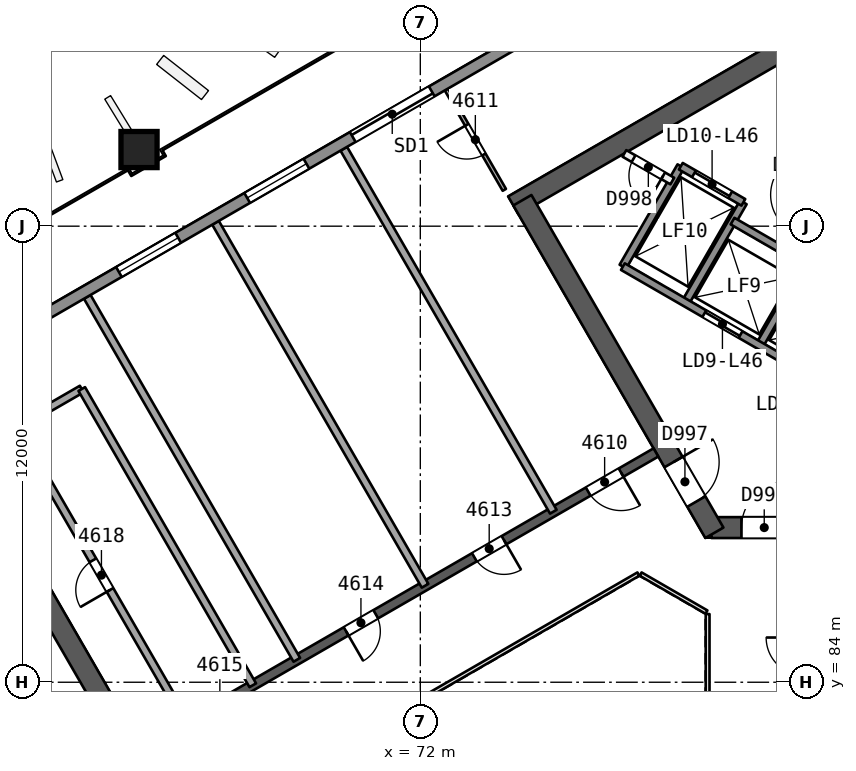
"""IFC4 building model, lengths in metres.
Left out: names, types, materials, properties, quantities, classifications, styles, units other than length and angle.
Written with IfcOpenShell. Run it as: python <this file> out.ifc"""

import sys

from ifc_helpers import new_model, si_unit, direction, frame, frame_2d, origin, origin_2d, place, context, subcontext, project, spatial, rectangle, extrude, element, fill, save


model = new_model("IFC4")
c1 = context("Model", 3, precision=1e-05, world=origin(), true_north=direction((0.0, 1.0)))
c2 = subcontext(c1, "Body", "Model", "MODEL_VIEW")
j1 = project(units=[si_unit("LENGTHUNIT", "METRE"), si_unit("PLANEANGLEUNIT", "RADIAN")], contexts=[c1])
p1 = place(None, origin())
s1 = spatial("IfcSite", under=j1, at=p1, CompositionType="ELEMENT")
p2 = place(p1, origin())
s2 = spatial("IfcBuilding", under=s1, at=p2, CompositionType="ELEMENT")
p3 = place(p2, frame((0.0, 0.0, 189.6)))
s3 = spatial("IfcBuildingStorey", under=s2, at=p3, CompositionType="ELEMENT", Elevation=189.6)
p4 = place(p3, frame((65.682, 80.0, 0.0), z_axis=(0.0, 0.0, 1.0), x_axis=(-0.500000202252, 0.866025287014, 0.0)))
e1 = element("IfcWall", 1, at=p4, inside=s3, PredefinedType="SHEAR", context=c2, shape_type="SweptSolid", body=[
    extrude(rectangle(XDim=10.221, YDim=0.55, at=frame_2d((5.111, 0.0))), origin(), (0.0, 0.0, 1.0), 3.7),
])
p5 = place(p4, frame((0.791, 0.0, 0.0)))
e2 = element("IfcOpeningElement", 2, at=p5, cuts=e1, PredefinedType="OPENING", context=c2, shape_type="SweptSolid", body=[
    extrude(rectangle(XDim=1.2, YDim=2.1, at=frame_2d((0.6, 1.05))), frame((0.0, 0.286, 0.0), z_axis=(0.0, -1.0, 0.0), x_axis=(1.0, 0.0, 0.0)), (0.0, 0.0, 1.0), 0.571),
])
p6 = place(p3, frame((79.659, 88.069, 0.0), z_axis=(0.0, 0.0, 1.0), x_axis=(1.0, 0.0, 0.0)))
e3 = element("IfcWall", 3, at=p6, inside=s3, PredefinedType="SHEAR", context=c2, shape_type="SweptSolid", body=[
    extrude(rectangle(XDim=10.221, YDim=0.55, at=frame_2d((5.111, 0.0))), origin(), (0.0, 0.0, 1.0), 3.7),
])
p7 = place(p6, frame((0.791, 0.0, 0.0)))
e4 = element("IfcOpeningElement", 4, at=p7, cuts=e3, PredefinedType="OPENING", context=c2, shape_type="SweptSolid", body=[
    extrude(rectangle(XDim=1.2, YDim=2.1, at=frame_2d((0.6, 1.05))), frame((0.0, 0.286, 0.0), z_axis=(0.0, -1.0, 0.0), x_axis=(1.0, 0.0, 0.0)), (0.0, 0.0, 1.0), 0.571),
])
p8 = place(p3, frame((86.723, 103.633, 0.0), z_axis=(0.0, 0.0, 1.0), x_axis=(-0.866023530946, -0.500003243837, 0.0)))
e5 = element("IfcWall", 5, at=p8, inside=s3, PredefinedType="SHEAR", context=c2, shape_type="SweptSolid", body=[
    extrude(rectangle(XDim=14.175, YDim=0.55, at=frame_2d((7.087, 0.0))), origin(), (0.0, 0.0, 1.0), 3.7),
])
p9 = place(p3, frame((74.686, 96.683, 0.0), z_axis=(0.0, 0.0, 1.0), x_axis=(0.499997818338, -0.866026663364, 0.0)))
e6 = element("IfcWall", 6, at=p9, inside=s3, PredefinedType="SHEAR", context=c2, shape_type="SweptSolid", body=[
    extrude(rectangle(XDim=10.105, YDim=0.55, at=frame_2d((5.052, 0.0))), origin(), (0.0, 0.0, 1.0), 3.7),
])
p10 = place(p9, frame((7.955, 0.0, 0.0)))
e7 = element("IfcOpeningElement", 7, at=p10, cuts=e6, PredefinedType="OPENING", context=c2, shape_type="SweptSolid", body=[
    extrude(rectangle(XDim=1.2, YDim=2.1, at=frame_2d((0.6, 1.05))), frame((0.0, 0.286, 0.0), z_axis=(0.0, -1.0, 0.0), x_axis=(1.0, 0.0, 0.0)), (0.0, 0.0, 1.0), 0.571),
])
p11 = place(p3, frame((78.2, 90.046, 0.0), z_axis=(0.0, 0.0, 1.0), x_axis=(-0.866026492143, -0.499998114903, 0.0)))
e8 = element("IfcWall", 8, at=p11, inside=s3, PredefinedType="SHEAR", context=c2, shape_type="SweptSolid", body=[
    extrude(rectangle(XDim=15.588, YDim=0.25, at=frame_2d((7.794, 0.0))), origin(), (0.0, 0.0, 1.0), 3.25),
])
p12 = place(p11, frame((1.059, 0.0, 0.0)))
e9 = element("IfcOpeningElement", 9, at=p12, cuts=e8, PredefinedType="OPENING", context=c2, shape_type="SweptSolid", body=[
    extrude(rectangle(XDim=1.0, YDim=2.1, at=frame_2d((0.5, 1.05))), frame((0.0, 0.135, 0.0), z_axis=(0.0, -1.0, 0.0), x_axis=(1.0, 0.0, 0.0)), (0.0, 0.0, 1.0), 0.271),
])
p13 = place(p11, frame((4.616, 0.0, 0.0)))
e10 = element("IfcOpeningElement", 10, at=p13, cuts=e8, PredefinedType="OPENING", context=c2, shape_type="SweptSolid", body=[
    extrude(rectangle(XDim=0.9, YDim=2.1, at=frame_2d((0.45, 1.05))), frame((0.0, 0.135, 0.0), z_axis=(0.0, -1.0, 0.0), x_axis=(1.0, 0.0, 0.0)), (0.0, 0.0, 1.0), 0.271),
])
p14 = place(p11, frame((8.513, 0.0, 0.0)))
e11 = element("IfcOpeningElement", 11, at=p14, cuts=e8, PredefinedType="OPENING", context=c2, shape_type="SweptSolid", body=[
    extrude(rectangle(XDim=0.9, YDim=2.1, at=frame_2d((0.45, 1.05))), frame((0.0, 0.135, 0.0), z_axis=(0.0, -1.0, 0.0), x_axis=(1.0, 0.0, 0.0)), (0.0, 0.0, 1.0), 0.271),
])
p15 = place(p11, frame((12.75, 0.0, 0.0)))
e12 = element("IfcOpeningElement", 12, at=p15, cuts=e8, PredefinedType="OPENING", context=c2, shape_type="SweptSolid", body=[
    extrude(rectangle(XDim=1.0, YDim=2.1, at=frame_2d((0.5, 1.05))), frame((0.0, 0.135, 0.0), z_axis=(0.0, -1.0, 0.0), x_axis=(1.0, 0.0, 0.0)), (0.0, 0.0, 1.0), 0.271),
])
p16 = place(p3, frame((64.586, 98.037, 0.0), z_axis=(0.010093620709, -0.017482414954, 0.999796221231), x_axis=(0.86601685016, 0.500014815019, 2.20911e-07)))
e13 = element("IfcColumn", 13, at=p16, inside=s3, PredefinedType="COLUMN", context=c2, shape_type="SweptSolid", body=[
    extrude(rectangle(XDim=0.95, YDim=0.95, at=origin_2d()), origin(), (0.0, 0.0, 1.0), 3.701),
])
p17 = place(p3, frame((74.21, 96.956, 0.0), z_axis=(0.0, 0.0, 1.0), x_axis=(-0.499978833458, 0.866037623948, 0.0)))
e14 = element("IfcWall", 14, at=p17, inside=s3, PredefinedType="PARTITIONING", context=c2, shape_type="SweptSolid", body=[
    extrude(rectangle(XDim=3.05, YDim=0.1, at=frame_2d((1.525, 0.0))), origin(), (0.0, 0.0, 1.0), 3.25),
])
p18 = place(p17, frame((1.075, 0.0, 0.0)))
e15 = element("IfcOpeningElement", 15, at=p18, cuts=e14, PredefinedType="OPENING", context=c2, shape_type="SweptSolid", body=[
    extrude(rectangle(XDim=0.9, YDim=2.1, at=frame_2d((0.45, 1.05))), frame((0.0, 0.061, 0.0), z_axis=(0.0, -1.0, 0.0), x_axis=(1.0, 0.0, 0.0)), (0.0, 0.0, 1.0), 0.121),
])
for number, where, z_axis, x_axis in (
    (16, (69.986, 98.038, 0.0), (0.0, 0.0, 1.0), (0.5, -0.866, 0.0)),
    (17, (66.611, 96.09, 0.0), (0.0, 0.0, 1.0), (0.5, -0.866, 0.0)),
    (18, (63.236, 94.141, 0.0), (0.0, 0.0, 1.0), (0.5, -0.866, 0.0)),
):
    element("IfcWall", number, at=place(p3, frame(where, z_axis=z_axis, x_axis=x_axis)), inside=s3, PredefinedType="PARTITIONING", context=c2, shape_type="SweptSolid", body=[
        extrude(rectangle(XDim=11.029, YDim=0.2, at=frame_2d((5.514, 0.0))), origin(), (0.0, 0.0, 1.0), 3.25),
    ])
p19 = place(p3, frame((65.859, 82.921, 0.0), z_axis=(0.0, 0.0, 1.0), x_axis=(-0.5000018851, 0.866024315419, 0.0)))
e19 = element("IfcWall", 19, at=p19, inside=s3, PredefinedType="PARTITIONING", context=c2, shape_type="SweptSolid", body=[
    extrude(rectangle(XDim=9.0, YDim=0.2, at=frame_2d((4.5, 0.0))), origin(), (0.0, 0.0, 1.0), 3.25),
])
p20 = place(p19, frame((4.05, 0.0, 0.0)))
e20 = element("IfcOpeningElement", 20, at=p20, cuts=e19, PredefinedType="OPENING", context=c2, shape_type="SweptSolid", body=[
    extrude(rectangle(XDim=0.9, YDim=2.1, at=frame_2d((0.45, 1.05))), frame((0.0, 0.11, 0.0), z_axis=(0.0, -1.0, 0.0), x_axis=(1.0, 0.0, 0.0)), (0.0, 0.0, 1.0), 0.221),
])
p21 = place(p3, frame((61.359, 90.715, 0.0), z_axis=(0.0, 0.0, 1.0), x_axis=(0.866041268327, 0.499972520799, 0.0)))
e21 = element("IfcWall", 21, at=p21, inside=s3, PredefinedType="PARTITIONING", context=c2, shape_type="SweptSolid", body=[
    extrude(rectangle(XDim=2.0, YDim=0.2, at=frame_2d((1.0, 0.0))), origin(), (0.0, 0.0, 1.0), 3.25),
])
p22 = place(p3, frame((63.091, 91.715, 0.0), z_axis=(0.0, 0.0, 1.0), x_axis=(0.5000018851, -0.866024315419, 0.0)))
e22 = element("IfcWall", 22, at=p22, inside=s3, PredefinedType="PARTITIONING", context=c2, shape_type="SweptSolid", body=[
    extrude(rectangle(XDim=9.0, YDim=0.2, at=frame_2d((4.5, 0.0))), origin(), (0.0, 0.0, 1.0), 3.25),
])
p23 = place(p3, frame((43.101, 82.689, 0.0), z_axis=(0.0, 0.0, 1.0), x_axis=(0.866025007541, 0.500000686313, 0.0)))
e23 = element("IfcWall", 23, at=p23, inside=s3, PredefinedType="SOLIDWALL", context=c2, shape_type="SweptSolid", body=[
    extrude(rectangle(XDim=52.562, YDim=0.3, at=frame_2d((26.281, 0.0))), origin(), (0.0, 0.0, 1.0), 3.25),
])
p24 = place(p23, frame((31.316, 0.0, 0.0)))
e24 = element("IfcOpeningElement", 24, at=p24, cuts=e23, PredefinedType="OPENING", context=c2, shape_type="SweptSolid", body=[
    extrude(rectangle(XDim=2.4, YDim=2.4, at=frame_2d((1.2, 1.2))), frame((0.0, 0.161, 0.0), z_axis=(0.0, -1.0, 0.0), x_axis=(1.0, 0.0, 0.0)), (0.0, 0.0, 1.0), 0.321),
])
p25 = place(p23, frame((40.864, 0.0, 0.0)))
e25 = element("IfcOpeningElement", 25, at=p25, cuts=e23, PredefinedType="OPENING", context=c2, shape_type="SweptSolid", body=[
    extrude(rectangle(XDim=2.4, YDim=2.4, at=frame_2d((1.2, 1.2))), frame((0.0, 0.161, 0.0), z_axis=(0.0, -1.0, 0.0), x_axis=(1.0, 0.0, 0.0)), (0.0, 0.0, 1.0), 0.321),
])
p26 = place(p23, frame((19.625, 0.0, 0.0)))
e26 = element("IfcOpeningElement", 26, at=p26, cuts=e23, PredefinedType="OPENING", context=c2, shape_type="SweptSolid", body=[
    extrude(rectangle(XDim=2.4, YDim=2.4, at=frame_2d((1.2, 1.2))), frame((0.0, 0.161, 0.0), z_axis=(0.0, -1.0, 0.0), x_axis=(1.0, 0.0, 0.0)), (0.0, 0.0, 1.0), 0.321),
])
p27 = place(p23, frame((9.277, 0.0, 0.0)))
e27 = element("IfcOpeningElement", 27, at=p27, cuts=e23, PredefinedType="OPENING", context=c2, shape_type="SweptSolid", body=[
    extrude(rectangle(XDim=2.4, YDim=2.4, at=frame_2d((1.2, 1.2))), frame((0.0, 0.161, 0.0), z_axis=(0.0, -1.0, 0.0), x_axis=(1.0, 0.0, 0.0)), (0.0, 0.0, 1.0), 0.321),
])
p28 = place(p23, frame((28.109, 0.0, 0.9)))
e28 = element("IfcOpeningElement", 28, at=p28, cuts=e23, PredefinedType="OPENING", context=c2, shape_type="SweptSolid", body=[
    extrude(rectangle(XDim=1.8, YDim=1.5, at=frame_2d((0.9, 0.75))), frame((0.0, 0.161, 0.0), z_axis=(0.0, -1.0, 0.0), x_axis=(1.0, 0.0, 0.0)), (0.0, 0.0, 1.0), 0.321),
])
p29 = place(p23, frame((24.212, 0.0, 0.9)))
e29 = element("IfcOpeningElement", 29, at=p29, cuts=e23, PredefinedType="OPENING", context=c2, shape_type="SweptSolid", body=[
    extrude(rectangle(XDim=1.8, YDim=1.5, at=frame_2d((0.9, 0.75))), frame((0.0, 0.161, 0.0), z_axis=(0.0, -1.0, 0.0), x_axis=(1.0, 0.0, 0.0)), (0.0, 0.0, 1.0), 0.321),
])
p30 = place(p3, frame((80.924, 92.861, 0.0), z_axis=(0.0, 0.0, 1.0), x_axis=(0.499961042966, 0.86604789447, 0.0)))
e30 = element("IfcWall", 30, at=p30, inside=s3, PredefinedType="SOLIDWALL", context=c2, shape_type="SweptSolid", body=[
    extrude(rectangle(XDim=2.48, YDim=0.2, at=frame_2d((1.24, 0.0))), origin(), (0.0, 0.0, 1.0), 3.25),
])
for number, where, z_axis, x_axis in (
    (31, (78.976, 93.986, 0.0), (0.0, 0.0, 1.0), (0.5, 0.866, 0.0)),
    (32, (77.33, 94.936, 0.0), (0.0, 0.0, 1.0), (0.5, 0.866, 0.0)),
):
    element("IfcWall", number, at=place(p3, frame(where, z_axis=z_axis, x_axis=x_axis)), inside=s3, PredefinedType="SOLIDWALL", context=c2, shape_type="SweptSolid", body=[
        extrude(rectangle(XDim=3.05, YDim=0.2, at=frame_2d((1.525, 0.0))), origin(), (0.0, 0.0, 1.0), 3.25),
    ])
p31 = place(p3, frame((86.77, 89.486, 0.0), z_axis=(0.0, 0.0, 1.0), x_axis=(-0.86601811187, 0.500012629753, 0.0)))
e33 = element("IfcWall", 33, at=p31, inside=s3, PredefinedType="SOLIDWALL", context=c2, shape_type="SweptSolid", body=[
    extrude(rectangle(XDim=10.9, YDim=0.2, at=frame_2d((5.45, 0.0))), origin(), (0.0, 0.0, 1.0), 3.25),
])
p32 = place(p31, frame((0.575, 0.0, 0.0)))
e34 = element("IfcOpeningElement", 34, at=p32, cuts=e33, PredefinedType="OPENING", context=c2, shape_type="SweptSolid", body=[
    extrude(rectangle(XDim=1.1, YDim=2.1, at=frame_2d((0.55, 1.05))), frame((0.0, 0.11, 0.0), z_axis=(0.0, -1.0, 0.0), x_axis=(1.0, 0.0, 0.0)), (0.0, 0.0, 1.0), 0.221),
])
p33 = place(p31, frame((2.825, 0.0, 0.0)))
e35 = element("IfcOpeningElement", 35, at=p33, cuts=e33, PredefinedType="OPENING", context=c2, shape_type="SweptSolid", body=[
    extrude(rectangle(XDim=1.1, YDim=2.1, at=frame_2d((0.55, 1.05))), frame((0.0, 0.11, 0.0), z_axis=(0.0, -1.0, 0.0), x_axis=(1.0, 0.0, 0.0)), (0.0, 0.0, 1.0), 0.221),
])
p34 = place(p31, frame((5.075, 0.0, 0.0)))
e36 = element("IfcOpeningElement", 36, at=p34, cuts=e33, PredefinedType="OPENING", context=c2, shape_type="SweptSolid", body=[
    extrude(rectangle(XDim=1.1, YDim=2.1, at=frame_2d((0.55, 1.05))), frame((0.0, 0.11, 0.0), z_axis=(0.0, -1.0, 0.0), x_axis=(1.0, 0.0, 0.0)), (0.0, 0.0, 1.0), 0.221),
])
p35 = place(p31, frame((7.325, 0.0, 0.0)))
e37 = element("IfcOpeningElement", 37, at=p35, cuts=e33, PredefinedType="OPENING", context=c2, shape_type="SweptSolid", body=[
    extrude(rectangle(XDim=1.1, YDim=2.1, at=frame_2d((0.55, 1.05))), frame((0.0, 0.11, 0.0), z_axis=(0.0, -1.0, 0.0), x_axis=(1.0, 0.0, 0.0)), (0.0, 0.0, 1.0), 0.221),
])
p36 = place(p3, frame((89.33, 90.872, 0.0), z_axis=(0.0, 0.0, 1.0), x_axis=(-0.866027589512, 0.49999621419, 0.0)))
e38 = element("IfcWall", 38, at=p36, inside=s3, PredefinedType="SOLIDWALL", context=c2, shape_type="SweptSolid", body=[
    extrude(rectangle(XDim=10.524, YDim=0.2, at=frame_2d((5.262, 0.0))), origin(), (0.0, 0.0, 1.0), 3.25),
])
p37 = place(p36, frame((0.312, 0.0, 0.0)))
e39 = element("IfcOpeningElement", 39, at=p37, cuts=e38, PredefinedType="OPENING", context=c2, shape_type="SweptSolid", body=[
    extrude(rectangle(XDim=0.9, YDim=2.1, at=frame_2d((0.45, 1.05))), frame((0.0, 0.11, 0.0), z_axis=(0.0, -1.0, 0.0), x_axis=(1.0, 0.0, 0.0)), (0.0, 0.0, 1.0), 0.221),
])
p38 = place(p3, frame((78.63, 97.188, 0.0), z_axis=(0.0, 0.0, 1.0), x_axis=(-0.866003949776, 0.500037157592, 0.0)))
e40 = element("IfcWall", 40, at=p38, inside=s3, PredefinedType="PARTITIONING", context=c2, shape_type="SweptSolid", body=[
    extrude(rectangle(XDim=1.455, YDim=0.2, at=frame_2d((0.728, 0.0))), origin(), (0.0, 0.0, 1.0), 3.25),
])
p39 = place(p38, frame((0.278, 0.0, 0.0)))
e41 = element("IfcOpeningElement", 41, at=p39, cuts=e40, PredefinedType="OPENING", context=c2, shape_type="SweptSolid", body=[
    extrude(rectangle(XDim=0.9, YDim=2.1, at=frame_2d((0.45, 1.05))), frame((0.0, 0.11, 0.0), z_axis=(0.0, -1.0, 0.0), x_axis=(1.0, 0.0, 0.0)), (0.0, 0.0, 1.0), 0.221),
])
p40 = place(p3, frame((80.5, 96.627, 0.0), z_axis=(0.0, 0.0, 1.0), x_axis=(-0.86601224135, 0.500022797313, 0.0)))
e42 = element("IfcWall", 42, at=p40, inside=s3, PredefinedType="SOLIDWALL", context=c2, shape_type="SweptSolid", body=[
    extrude(rectangle(XDim=1.9, YDim=0.2, at=frame_2d((0.95, 0.0))), origin(), (0.0, 0.0, 1.0), 3.25),
])
p41 = place(p40, frame((0.4, 0.0, 0.0)))
e43 = element("IfcOpeningElement", 43, at=p41, cuts=e42, PredefinedType="OPENING", context=c2, shape_type="SweptSolid", body=[
    extrude(rectangle(XDim=1.1, YDim=2.1, at=frame_2d((0.55, 1.05))), frame((0.0, 0.11, 0.0), z_axis=(0.0, -1.0, 0.0), x_axis=(1.0, 0.0, 0.0)), (0.0, 0.0, 1.0), 0.221),
])
p42 = place(p3, frame((79.56, 74.206, 0.0), z_axis=(0.0, 0.0, 1.0), x_axis=(0.0, 1.0, 0.0)))
e44 = element("IfcWall", 44, at=p42, inside=s3, PredefinedType="PARTITIONING", context=c2, shape_type="SweptSolid", body=[
    extrude(rectangle(XDim=11.588, YDim=0.1, at=frame_2d((5.794, 0.0))), origin(), (0.0, 0.0, 1.0), 3.25),
])
p43 = place(p3, frame((79.53, 85.846, 0.0), z_axis=(0.0, 0.0, 1.0), x_axis=(-0.866041268327, 0.499972520799, 0.0)))
e45 = element("IfcWall", 45, at=p43, inside=s3, PredefinedType="PARTITIONING", context=c2, shape_type="SweptSolid", body=[
    extrude(rectangle(XDim=2.0, YDim=0.1, at=frame_2d((1.0, 0.0))), origin(), (0.0, 0.0, 1.0), 3.25),
])
p44 = place(p3, frame((77.738, 86.846, 0.0), z_axis=(0.0, 0.0, 1.0), x_axis=(-0.866026658274, -0.499997827154, 0.0)))
e46 = element("IfcWall", 46, at=p44, inside=s3, PredefinedType="PARTITIONING", context=c2, shape_type="SweptSolid", body=[
    extrude(rectangle(XDim=11.588, YDim=0.1, at=frame_2d((5.794, 0.0))), origin(), (0.0, 0.0, 1.0), 3.25),
])
p45 = place(p12, origin())
e47 = element("IfcDoor", 47, at=p45, inside=s3, OperationType="SINGLE_SWING_LEFT", PredefinedType="NOTDEFINED", context=c2, shape_type="SweptSolid", body=[
    extrude(rectangle(XDim=1.0, YDim=2.1, at=frame_2d((0.5, 1.05))), frame((0.0, 0.025, 0.0), z_axis=(0.0, -1.0, 0.0), x_axis=(1.0, 0.0, 0.0)), (0.0, 0.0, 1.0), 0.05),
])
fill(e9, e47)
p46 = place(p18, origin())
e48 = element("IfcDoor", 48, at=p46, inside=s3, OperationType="SINGLE_SWING_RIGHT", PredefinedType="NOTDEFINED", context=c2, shape_type="SweptSolid", body=[
    extrude(rectangle(XDim=0.9, YDim=2.1, at=frame_2d((0.45, 1.05))), frame((0.0, 0.025, 0.0), z_axis=(0.0, -1.0, 0.0), x_axis=(1.0, 0.0, 0.0)), (0.0, 0.0, 1.0), 0.05),
])
fill(e15, e48)
p47 = place(p13, origin())
e49 = element("IfcDoor", 49, at=p47, inside=s3, OperationType="SINGLE_SWING_LEFT", PredefinedType="NOTDEFINED", context=c2, shape_type="SweptSolid", body=[
    extrude(rectangle(XDim=0.9, YDim=2.1, at=frame_2d((0.45, 1.05))), frame((0.0, 0.025, 0.0), z_axis=(0.0, -1.0, 0.0), x_axis=(1.0, 0.0, 0.0)), (0.0, 0.0, 1.0), 0.05),
])
fill(e10, e49)
p48 = place(p14, origin())
e50 = element("IfcDoor", 50, at=p48, inside=s3, OperationType="SINGLE_SWING_RIGHT", PredefinedType="NOTDEFINED", context=c2, shape_type="SweptSolid", body=[
    extrude(rectangle(XDim=0.9, YDim=2.1, at=frame_2d((0.45, 1.05))), frame((0.0, 0.025, 0.0), z_axis=(0.0, -1.0, 0.0), x_axis=(1.0, 0.0, 0.0)), (0.0, 0.0, 1.0), 0.05),
])
fill(e11, e50)
p49 = place(p20, origin())
e51 = element("IfcDoor", 51, at=p49, inside=s3, OperationType="SINGLE_SWING_LEFT", PredefinedType="NOTDEFINED", context=c2, shape_type="SweptSolid", body=[
    extrude(rectangle(XDim=0.9, YDim=2.1, at=frame_2d((0.45, 1.05))), frame((0.0, 0.025, 0.0), z_axis=(0.0, -1.0, 0.0), x_axis=(1.0, 0.0, 0.0)), (0.0, 0.0, 1.0), 0.05),
])
fill(e20, e51)
p50 = place(p24, origin())
e52 = element("IfcDoor", 52, at=p50, inside=s3, OperationType="SLIDING_TO_LEFT", PredefinedType="NOTDEFINED", context=c2, shape_type="SweptSolid", body=[
    extrude(rectangle(XDim=2.4, YDim=2.4, at=frame_2d((1.2, 1.2))), frame((0.0, 0.025, 0.0), z_axis=(0.0, -1.0, 0.0), x_axis=(1.0, 0.0, 0.0)), (0.0, 0.0, 1.0), 0.05),
])
fill(e24, e52)
p51 = place(p28, origin())
e53 = element("IfcWindow", 53, at=p51, inside=s3, PartitioningType="SINGLE_PANEL", PredefinedType="WINDOW", context=c2, shape_type="SweptSolid", body=[
    extrude(rectangle(XDim=1.8, YDim=1.5, at=frame_2d((0.9, 0.75))), frame((0.0, 0.03, 0.0), z_axis=(0.0, -1.0, 0.0), x_axis=(1.0, 0.0, 0.0)), (0.0, 0.0, 1.0), 0.06),
])
fill(e28, e53)
p52 = place(p29, origin())
e54 = element("IfcWindow", 54, at=p52, inside=s3, PartitioningType="SINGLE_PANEL", PredefinedType="WINDOW", context=c2, shape_type="SweptSolid", body=[
    extrude(rectangle(XDim=1.8, YDim=1.5, at=frame_2d((0.9, 0.75))), frame((0.0, 0.03, 0.0), z_axis=(0.0, -1.0, 0.0), x_axis=(1.0, 0.0, 0.0)), (0.0, 0.0, 1.0), 0.06),
])
fill(e29, e54)
p53 = place(p7, origin())
e55 = element("IfcDoor", 55, at=p53, inside=s3, OperationType="SINGLE_SWING_RIGHT", PredefinedType="NOTDEFINED", context=c2, shape_type="SweptSolid", body=[
    extrude(rectangle(XDim=1.2, YDim=2.1, at=frame_2d((0.6, 1.05))), frame((0.0, 0.025, 0.0), z_axis=(0.0, -1.0, 0.0), x_axis=(1.0, 0.0, 0.0)), (0.0, 0.0, 1.0), 0.05),
])
fill(e4, e55)
p54 = place(p10, origin())
e56 = element("IfcDoor", 56, at=p54, inside=s3, OperationType="SINGLE_SWING_LEFT", PredefinedType="NOTDEFINED", context=c2, shape_type="SweptSolid", body=[
    extrude(rectangle(XDim=1.2, YDim=2.1, at=frame_2d((0.6, 1.05))), frame((0.0, 0.025, 0.0), z_axis=(0.0, -1.0, 0.0), x_axis=(1.0, 0.0, 0.0)), (0.0, 0.0, 1.0), 0.05),
])
fill(e7, e56)
p55 = place(p35, origin())
e57 = element("IfcDoor", 57, at=p55, inside=s3, OperationType="SLIDING_TO_LEFT", PredefinedType="NOTDEFINED", context=c2, shape_type="SweptSolid", body=[
    extrude(rectangle(XDim=1.1, YDim=2.1, at=frame_2d((0.55, 1.05))), frame((0.0, 0.025, 0.0), z_axis=(0.0, -1.0, 0.0), x_axis=(1.0, 0.0, 0.0)), (0.0, 0.0, 1.0), 0.05),
])
fill(e37, e57)
p56 = place(p41, origin())
e58 = element("IfcDoor", 58, at=p56, inside=s3, OperationType="SLIDING_TO_RIGHT", PredefinedType="NOTDEFINED", context=c2, shape_type="SweptSolid", body=[
    extrude(rectangle(XDim=1.1, YDim=2.1, at=frame_2d((0.55, 1.05))), frame((0.0, 0.025, 0.0), z_axis=(0.0, -1.0, 0.0), x_axis=(1.0, 0.0, 0.0)), (0.0, 0.0, 1.0), 0.05),
])
fill(e43, e58)
p57 = place(p39, origin())
e59 = element("IfcDoor", 59, at=p57, inside=s3, OperationType="SINGLE_SWING_LEFT", PredefinedType="NOTDEFINED", context=c2, shape_type="SweptSolid", body=[
    extrude(rectangle(XDim=0.9, YDim=2.1, at=frame_2d((0.45, 1.05))), frame((0.0, 0.025, 0.0), z_axis=(0.0, -1.0, 0.0), x_axis=(1.0, 0.0, 0.0)), (0.0, 0.0, 1.0), 0.05),
])
fill(e41, e59)
save(model, sys.argv[1])
